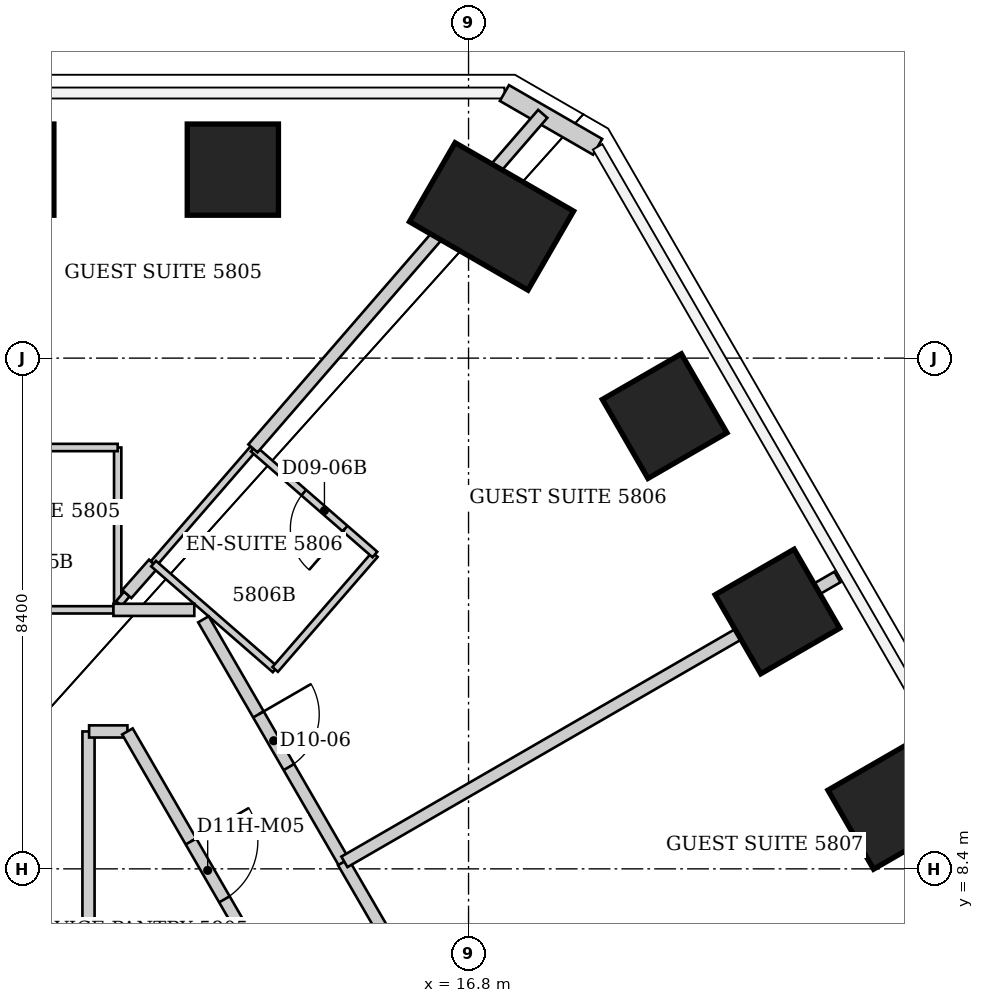
"""IFC4 building model, lengths in metres.
Left out: names, types, materials, properties, quantities, classifications, styles, units other than length and angle.
Written with IfcOpenShell. Run it as: python <this file> out.ifc"""

import sys

from ifc_helpers import new_model, si_unit, direction, frame, frame_2d, origin, origin_2d, place, context, subcontext, project, spatial, rectangle, extrude, element, fill, save


model = new_model("IFC4")
c1 = context("Model", 3, precision=1e-05, world=origin(), true_north=direction((0.0, 1.0)))
c2 = subcontext(c1, "Body", "Model", "MODEL_VIEW")
j1 = project(units=[si_unit("LENGTHUNIT", "METRE"), si_unit("PLANEANGLEUNIT", "RADIAN")], contexts=[c1])
p1 = place(None, origin())
s1 = spatial("IfcSite", under=j1, at=p1, CompositionType="ELEMENT")
p2 = place(p1, origin())
s2 = spatial("IfcBuilding", under=s1, at=p2, CompositionType="ELEMENT")
p3 = place(p2, frame((0.0, 0.0, 232.6)))
s3 = spatial("IfcBuildingStorey", under=s2, at=p3, CompositionType="ELEMENT", Elevation=232.6)
p4 = place(p3, frame((9.231, 19.9, -0.06), z_axis=(-0.025317785915, -0.054550042471, 0.998190013265), x_axis=(-0.001183738063, 0.998511018064, 0.054537561078)))
e1 = element("IfcColumn", 1, at=p4, inside=s3, PredefinedType="COLUMN", context=c2, shape_type="SweptSolid", body=[
    extrude(rectangle(XDim=1.5, YDim=1.5, at=origin_2d()), origin(), (0.0, 0.0, 1.0), 3.867),
])
p5 = place(p3, frame((12.924, 19.9, -0.068), z_axis=(-0.035465370418, -0.05455241702, 0.997880875304), x_axis=(-0.001454113511, 0.998510791345, 0.054535173247)))
e2 = element("IfcColumn", 2, at=p5, inside=s3, PredefinedType="COLUMN", context=c2, shape_type="SweptSolid", body=[
    extrude(rectangle(XDim=1.5, YDim=1.5, at=origin_2d()), origin(), (0.0, 0.0, 1.0), 3.876),
])
p6 = place(p3, frame((17.178, 19.131, -0.069), z_axis=(-0.047462720367, -0.052876240197, 0.997472502577), x_axis=(0.497750920441, 0.864529877343, 0.069513397134)))
e3 = element("IfcColumn", 3, at=p6, inside=s3, PredefinedType="COLUMN", context=c2, shape_type="SweptSolid", body=[
    extrude(rectangle(XDim=1.5, YDim=2.25, at=origin_2d()), origin(), (0.0, 0.0, 1.0), 3.878),
])
p7 = place(p3, frame((20.025, 15.846, -0.059), z_axis=(-0.054031269339, -0.042795795107, 0.997621742874), x_axis=(0.86412054036, 0.498643763079, 0.068191563044)))
e4 = element("IfcColumn", 4, at=p7, inside=s3, PredefinedType="COLUMN", context=c2, shape_type="SweptSolid", body=[
    extrude(rectangle(XDim=1.5, YDim=1.5, at=origin_2d()), origin(), (0.0, 0.0, 1.0), 3.868),
])
p8 = place(p3, frame((21.88, 12.633, -0.051), z_axis=(-0.059073478929, -0.034090583664, 0.99767136683), x_axis=(0.86410694155, 0.498665569053, 0.068204426596)))
e5 = element("IfcColumn", 5, at=p8, inside=s3, PredefinedType="COLUMN", context=c2, shape_type="SweptSolid", body=[
    extrude(rectangle(XDim=1.5, YDim=1.5, at=origin_2d()), origin(), (0.0, 0.0, 1.0), 3.86),
])
p9 = place(p3, frame((23.735, 9.419, -0.059), z_axis=(-0.064004664797, -0.025374630423, 0.997626949824), x_axis=(0.863841955807, 0.499136409128, 0.068116961699)))
e6 = element("IfcColumn", 6, at=p9, inside=s3, PredefinedType="COLUMN", context=c2, shape_type="SweptSolid", body=[
    extrude(rectangle(XDim=1.5, YDim=1.5, at=origin_2d()), origin(), (0.0, 0.0, 1.0), 3.868),
])
p10 = place(p3, frame((17.39, 21.16, 0.0), z_axis=(0.0, 0.0, 1.0), x_axis=(0.866036293601, -0.499981137809, 0.0)))
e7 = element("IfcWall", 7, at=p10, inside=s3, PredefinedType="SOLIDWALL", context=c2, shape_type="SweptSolid", body=[
    extrude(rectangle(XDim=1.77, YDim=0.3, at=frame_2d((0.885, 0.0))), origin(), (0.0, 0.0, 1.0), 3.64),
])
p11 = place(p3, frame((10.55, 6.09, 0.0), z_axis=(0.0, 0.0, 1.0), x_axis=(0.0, 1.0, 0.0)))
e8 = element("IfcWall", 8, at=p11, inside=s3, PredefinedType="PARTITIONING", context=c2, shape_type="SweptSolid", body=[
    extrude(rectangle(XDim=4.57, YDim=0.2, at=frame_2d((2.285, 0.0))), origin(), (0.0, 0.0, 1.0), 3.64),
])
p12 = place(p3, frame((10.56, 10.66, 0.0), z_axis=(0.0, 0.0, 1.0), x_axis=(1.0, 0.0, 0.0)))
e9 = element("IfcWall", 9, at=p12, inside=s3, PredefinedType="PARTITIONING", context=c2, shape_type="SweptSolid", body=[
    extrude(rectangle(XDim=0.63, YDim=0.2, at=frame_2d((0.315, 0.0))), origin(), (0.0, 0.0, 1.0), 3.64),
])
p13 = place(p3, frame((10.96, 12.66, 0.0), z_axis=(0.0, 0.0, 1.0), x_axis=(-1.0, 0.0, 0.0)))
e10 = element("IfcWall", 10, at=p13, inside=s3, PredefinedType="PARTITIONING", context=c2, shape_type="SweptSolid", body=[
    extrude(rectangle(XDim=2.43, YDim=0.12, at=frame_2d((1.215, 0.0))), origin(), (0.0, 0.0, 1.0), 3.64),
])
p14 = place(p3, frame((11.03, 12.74, 0.0), z_axis=(0.0, 0.0, 1.0), x_axis=(0.0, 1.0, 0.0)))
e11 = element("IfcWall", 11, at=p14, inside=s3, PredefinedType="PARTITIONING", context=c2, shape_type="SweptSolid", body=[
    extrude(rectangle(XDim=2.59, YDim=0.12, at=frame_2d((1.295, 0.0))), origin(), (0.0, 0.0, 1.0), 3.038),
])
p15 = place(p3, frame((11.03, 15.33, 0.0), z_axis=(0.0, 0.0, 1.0), x_axis=(-1.0, 0.0, 0.0)))
e12 = element("IfcWall", 12, at=p15, inside=s3, PredefinedType="PARTITIONING", context=c2, shape_type="SweptSolid", body=[
    extrude(rectangle(XDim=2.5, YDim=0.12, at=frame_2d((1.25, 0.0))), origin(), (0.0, 0.0, 1.0), 3.64),
])
p16 = place(p3, frame((11.049, 12.763, 0.0), z_axis=(0.0, 0.0, 1.0), x_axis=(0.639596257895, 0.768711016499, 0.0)))
e13 = element("IfcWall", 13, at=p16, inside=s3, PredefinedType="PARTITIONING", context=c2, shape_type="SweptSolid", body=[
    extrude(rectangle(XDim=0.204, YDim=0.12, at=frame_2d((0.102, 0.0))), origin(), (0.0, 0.0, 1.0), 3.64),
])
p17 = place(p3, frame((11.18, 12.92, 0.0), z_axis=(0.0, 0.0, 1.0), x_axis=(0.660578310858, 0.750757147967, 0.0)))
e14 = element("IfcWall", 14, at=p17, inside=s3, PredefinedType="PARTITIONING", context=c2, shape_type="SweptSolid", body=[
    extrude(rectangle(XDim=0.666, YDim=0.2, at=frame_2d((0.333, 0.0))), origin(), (0.0, 0.0, 1.0), 3.64),
])
p18 = place(p3, frame((11.19, 10.66, 0.0), z_axis=(0.0, 0.0, 1.0), x_axis=(0.500248310865, -0.865881993967, 0.0)))
e15 = element("IfcWall", 15, at=p18, inside=s3, PredefinedType="PARTITIONING", context=c2, shape_type="SweptSolid", body=[
    extrude(rectangle(XDim=5.278, YDim=0.2, at=frame_2d((2.639, 0.0))), origin(), (0.0, 0.0, 1.0), 3.64),
])
p19 = place(p18, frame((2.089, 0.0, 0.0)))
e16 = element("IfcOpeningElement", 16, at=p19, cuts=e15, PredefinedType="OPENING", context=c2, shape_type="SweptSolid", body=[
    extrude(rectangle(XDim=1.1, YDim=2.2, at=frame_2d((0.55, 1.1))), frame((0.0, 0.1, 0.0), z_axis=(0.0, -1.0, 0.0), x_axis=(1.0, 0.0, 0.0)), (0.0, 0.0, 1.0), 0.2),
])
p20 = place(p3, frame((11.62, 13.42, 0.0), z_axis=(0.0, 0.0, 1.0), x_axis=(0.655335308977, 0.755338091723, 0.0)))
e17 = element("IfcWall", 17, at=p20, inside=s3, PredefinedType="PARTITIONING", context=c2, shape_type="SweptSolid", body=[
    extrude(rectangle(XDim=2.502, YDim=0.12, at=frame_2d((1.251, 0.0))), origin(), (0.0, 0.0, 1.0), 3.64),
])
p21 = place(p3, frame((11.62, 13.42, 0.0), z_axis=(0.0, 0.0, 1.0), x_axis=(0.754444902764, -0.656363381591, 0.0)))
e18 = element("IfcWall", 18, at=p21, inside=s3, PredefinedType="PARTITIONING", context=c2, shape_type="SweptSolid", body=[
    extrude(rectangle(XDim=2.651, YDim=0.12, at=frame_2d((1.325, 0.0))), origin(), (0.0, 0.0, 1.0), 3.64),
])
p22 = place(p3, frame((12.29, 12.66, 0.0), z_axis=(0.0, 0.0, 1.0), x_axis=(-1.0, 0.0, 0.0)))
e19 = element("IfcWall", 19, at=p22, inside=s3, PredefinedType="PARTITIONING", context=c2, shape_type="SweptSolid", body=[
    extrude(rectangle(XDim=1.33, YDim=0.2, at=frame_2d((0.665, 0.0))), origin(), (0.0, 0.0, 1.0), 3.64),
])
p23 = place(p3, frame((12.44, 12.504, 0.0), z_axis=(0.0, 0.0, 1.0), x_axis=(0.500616963614, -0.865668906535, 0.0)))
e20 = element("IfcWall", 20, at=p23, inside=s3, PredefinedType="PARTITIONING", context=c2, shape_type="SweptSolid", body=[
    extrude(rectangle(XDim=4.614, YDim=0.2, at=frame_2d((2.307, 0.0))), origin(), (0.0, 0.0, 1.0), 3.64),
])
p24 = place(p23, frame((1.807, 0.0, 0.0)))
e21 = element("IfcOpeningElement", 21, at=p24, cuts=e20, PredefinedType="OPENING", context=c2, shape_type="SweptSolid", body=[
    extrude(rectangle(XDim=1.0, YDim=2.13, at=frame_2d((0.5, 1.065))), frame((0.0, 0.1, 0.0), z_axis=(0.0, -1.0, 0.0), x_axis=(1.0, 0.0, 0.0)), (0.0, 0.0, 1.0), 0.2),
])
p25 = place(p3, frame((13.62, 11.68, 0.0), z_axis=(0.0, 0.0, 1.0), x_axis=(0.655335308977, 0.755338091723, 0.0)))
e22 = element("IfcWall", 22, at=p25, inside=s3, PredefinedType="PARTITIONING", context=c2, shape_type="SweptSolid", body=[
    extrude(rectangle(XDim=2.502, YDim=0.12, at=frame_2d((1.251, 0.0))), origin(), (0.0, 0.0, 1.0), 3.64),
])
p26 = place(p3, frame((15.26, 13.57, 0.0), z_axis=(0.0, 0.0, 1.0), x_axis=(-0.754444902764, 0.656363381591, 0.0)))
e23 = element("IfcWall", 23, at=p26, inside=s3, PredefinedType="PARTITIONING", context=c2, shape_type="SweptSolid", body=[
    extrude(rectangle(XDim=2.651, YDim=0.12, at=frame_2d((1.325, 0.0))), origin(), (0.0, 0.0, 1.0), 3.64),
])
p27 = place(p26, frame((0.65, 0.0, 0.0)))
e24 = element("IfcOpeningElement", 24, at=p27, cuts=e23, PredefinedType="OPENING", context=c2, shape_type="SweptSolid", body=[
    extrude(rectangle(XDim=0.9, YDim=2.03, at=frame_2d((0.45, 1.015))), frame((0.0, 0.06, 0.0), z_axis=(0.0, -1.0, 0.0), x_axis=(1.0, 0.0, 0.0)), (0.0, 0.0, 1.0), 0.12),
])
p28 = place(p3, frame((17.14, 4.37, 0.0), z_axis=(0.0, 0.0, 1.0), x_axis=(-0.501524901322, 0.865143209737, 0.0)))
e25 = element("IfcWall", 25, at=p28, inside=s3, PredefinedType="PARTITIONING", context=c2, shape_type="SweptSolid", body=[
    extrude(rectangle(XDim=4.785, YDim=0.2, at=frame_2d((2.393, 0.0))), origin(), (0.0, 0.0, 1.0), 3.64),
])
p29 = place(p28, frame((1.893, 0.0, 0.0)))
e26 = element("IfcOpeningElement", 26, at=p29, cuts=e25, PredefinedType="OPENING", context=c2, shape_type="SweptSolid", body=[
    extrude(rectangle(XDim=1.0, YDim=2.13, at=frame_2d((0.5, 1.065))), frame((0.0, 0.1, 0.0), z_axis=(0.0, -1.0, 0.0), x_axis=(1.0, 0.0, 0.0)), (0.0, 0.0, 1.0), 0.2),
])
p30 = place(p3, frame((18.02, 20.817, 0.0), z_axis=(0.0, 0.0, 1.0), x_axis=(-0.654701954033, -0.755887128733, 0.0)))
e27 = element("IfcWall", 27, at=p30, inside=s3, PredefinedType="PARTITIONING", context=c2, shape_type="SweptSolid", body=[
    extrude(rectangle(XDim=7.28, YDim=0.2, at=frame_2d((3.64, 0.0))), origin(), (0.0, 0.0, 1.0), 3.64),
])
p31 = place(p3, frame((22.866, 13.2, 0.0), z_axis=(0.0, 0.0, 1.0), x_axis=(-0.865840726882, -0.500319733442, 0.0)))
e28 = element("IfcWall", 28, at=p31, inside=s3, PredefinedType="PARTITIONING", context=c2, shape_type="SweptSolid", body=[
    extrude(rectangle(XDim=9.364, YDim=0.2, at=frame_2d((4.682, 0.0))), origin(), (0.0, 0.0, 1.0), 2.878),
])
p32 = place(p24, origin())
e29 = element("IfcDoor", 29, at=p32, inside=s3, OperationType="SINGLE_SWING_LEFT", PredefinedType="DOOR", context=c2, shape_type="SweptSolid", body=[
    extrude(rectangle(XDim=1.0, YDim=2.13, at=frame_2d((0.5, 1.065))), frame((0.0, 0.025, 0.0), z_axis=(0.0, -1.0, 0.0), x_axis=(1.0, 0.0, 0.0)), (0.0, 0.0, 1.0), 0.05),
])
fill(e21, e29)
p33 = place(p27, origin())
e30 = element("IfcDoor", 30, at=p33, inside=s3, OperationType="SINGLE_SWING_LEFT", PredefinedType="DOOR", context=c2, shape_type="SweptSolid", body=[
    extrude(rectangle(XDim=0.9, YDim=2.03, at=frame_2d((0.45, 1.015))), frame((0.0, 0.025, 0.0), z_axis=(0.0, -1.0, 0.0), x_axis=(1.0, 0.0, 0.0)), (0.0, 0.0, 1.0), 0.05),
])
fill(e24, e30)
p34 = place(p19, origin())
e31 = element("IfcDoor", 31, at=p34, inside=s3, OperationType="SINGLE_SWING_LEFT", PredefinedType="DOOR", context=c2, shape_type="SweptSolid", body=[
    extrude(rectangle(XDim=1.1, YDim=2.2, at=frame_2d((0.55, 1.1))), frame((0.0, 0.025, 0.0), z_axis=(0.0, -1.0, 0.0), x_axis=(1.0, 0.0, 0.0)), (0.0, 0.0, 1.0), 0.05),
])
fill(e16, e31)
save(model, sys.argv[1])
